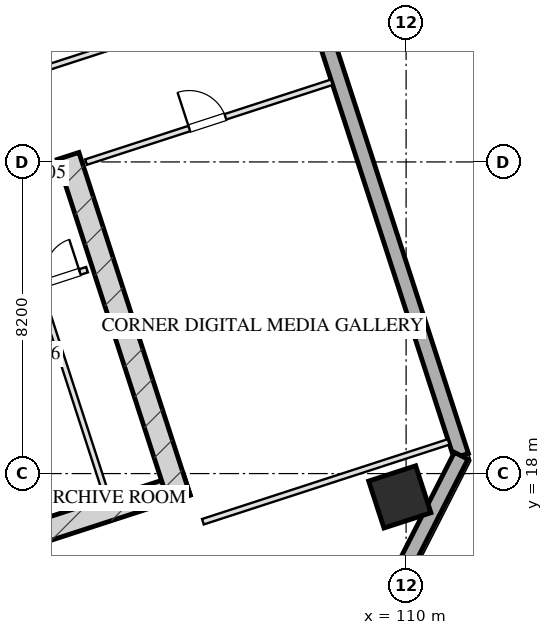
"""IFC4 building model, lengths in metres.
Left out: names, types, materials, properties, quantities, classifications, styles, units other than length and angle.
Written with IfcOpenShell. Run it as: python <this file> out.ifc"""

import sys

from ifc_helpers import new_model, si_unit, direction, frame, frame_2d, origin, origin_2d, place, context, subcontext, project, spatial, rectangle, hollow_rectangle, extrude, element, fill, save


model = new_model("IFC4")
c1 = context("Model", 3, precision=1e-05, world=origin(), true_north=direction((0.0, 1.0)))
c2 = subcontext(c1, "Body", "Model", "MODEL_VIEW")
j1 = project(units=[si_unit("LENGTHUNIT", "METRE"), si_unit("PLANEANGLEUNIT", "RADIAN")], contexts=[c1])
p1 = place(None, origin())
s1 = spatial("IfcSite", under=j1, at=p1, CompositionType="ELEMENT")
p2 = place(p1, origin())
s2 = spatial("IfcBuilding", under=s1, at=p2, CompositionType="ELEMENT")
p3 = place(p2, frame((0.0, 0.0, 180.55)))
s3 = spatial("IfcBuildingStorey", under=s2, at=p3, CompositionType="ELEMENT", Elevation=180.55)
p4 = place(p3, frame((88.63, 12.652, 0.0), z_axis=(0.0, 0.0, 1.0), x_axis=(0.95105714907, 0.309015046886, 0.0)))
e1 = element("IfcWall", 1, at=p4, inside=s3, PredefinedType="SHEAR", context=c2, shape_type="SweptSolid", body=[
    extrude(rectangle(XDim=16.4, YDim=0.6, at=frame_2d((8.2, 0.0))), origin(), (0.0, 0.0, 1.0), 3.45),
])
p5 = place(p3, frame((101.105, 26.358, 0.0), z_axis=(0.0, 0.0, 1.0), x_axis=(0.309010370028, -0.95105866865, 0.0)))
e2 = element("IfcWall", 2, at=p5, inside=s3, PredefinedType="SHEAR", context=c2, shape_type="SweptSolid", body=[
    extrude(rectangle(XDim=9.48, YDim=0.6, at=frame_2d((4.74, 0.0))), origin(), (0.0, 0.0, 1.0), 3.45),
])
p6 = place(p3, frame((109.835, 17.386, 0.0), z_axis=(0.0, 0.0, 1.0), x_axis=(0.951056516295, 0.309016994375, 0.0)))
e3 = element("IfcColumn", 3, at=p6, inside=s3, PredefinedType="COLUMN", context=c2, shape_type="SweptSolid", body=[
    extrude(hollow_rectangle(XDim=1.3, YDim=1.3, WallThickness=0.045, at=origin_2d()), origin(), (0.0, 0.0, 1.0), 3.451),
])
p7 = place(p3, frame((98.224, 59.173, 0.0), z_axis=(0.0, 0.0, 1.0), x_axis=(0.309014228706, -0.951057414911, 0.0)))
e4 = element("IfcWall", 4, at=p7, inside=s3, PredefinedType="SOLIDWALL", context=c2, shape_type="SweptSolid", body=[
    extrude(rectangle(XDim=42.8, YDim=0.4, at=frame_2d((21.4, 0.0))), origin(), (0.0, 0.0, 1.0), 2.55),
])
p8 = place(p7, frame((26.75, 0.0, 0.75)))
e5 = element("IfcOpeningElement", 5, at=p8, cuts=e4, PredefinedType="OPENING", context=c2, shape_type="SweptSolid", body=[
    extrude(rectangle(XDim=2.1, YDim=1.4, at=frame_2d((1.05, 0.7))), frame((0.0, 0.21, 0.0), z_axis=(0.0, -1.0, 0.0), x_axis=(1.0, 0.0, 0.0)), (0.0, 0.0, 1.0), 0.42),
])
p9 = place(p7, frame((22.95, 0.0, 0.75)))
e6 = element("IfcOpeningElement", 6, at=p9, cuts=e4, PredefinedType="OPENING", context=c2, shape_type="SweptSolid", body=[
    extrude(rectangle(XDim=2.1, YDim=1.4, at=frame_2d((1.05, 0.7))), frame((0.0, 0.21, 0.0), z_axis=(0.0, -1.0, 0.0), x_axis=(1.0, 0.0, 0.0)), (0.0, 0.0, 1.0), 0.42),
])
p10 = place(p7, frame((17.75, 0.0, 0.75)))
e7 = element("IfcOpeningElement", 7, at=p10, cuts=e4, PredefinedType="OPENING", context=c2, shape_type="SweptSolid", body=[
    extrude(rectangle(XDim=2.1, YDim=1.4, at=frame_2d((1.05, 0.7))), frame((0.0, 0.21, 0.0), z_axis=(0.0, -1.0, 0.0), x_axis=(1.0, 0.0, 0.0)), (0.0, 0.0, 1.0), 0.42),
])
p11 = place(p7, frame((13.95, 0.0, 0.75)))
e8 = element("IfcOpeningElement", 8, at=p11, cuts=e4, PredefinedType="OPENING", context=c2, shape_type="SweptSolid", body=[
    extrude(rectangle(XDim=2.1, YDim=1.4, at=frame_2d((1.05, 0.7))), frame((0.0, 0.21, 0.0), z_axis=(0.0, -1.0, 0.0), x_axis=(1.0, 0.0, 0.0)), (0.0, 0.0, 1.0), 0.42),
])
p12 = place(p3, frame((111.449, 18.468, 0.0), z_axis=(0.0, 0.0, 1.0), x_axis=(-0.454019523198, -0.890991735402, 0.0)))
e9 = element("IfcWall", 9, at=p12, inside=s3, PredefinedType="SOLIDWALL", context=c2, shape_type="SweptSolid", body=[
    extrude(rectangle(XDim=3.394, YDim=0.4, at=frame_2d((1.697, 0.0))), origin(), (0.0, 0.0, 1.0), 2.55),
])
p13 = place(p3, frame((97.727, 24.944, 0.0), z_axis=(0.0, 0.0, 1.0), x_axis=(0.951036872128, 0.309077446369, 0.0)))
e10 = element("IfcWall", 10, at=p13, inside=s3, PredefinedType="PARTITIONING", context=c2, shape_type="SweptSolid", body=[
    extrude(rectangle(XDim=3.2, YDim=0.15, at=frame_2d((1.6, 0.0))), origin(), (0.0, 0.0, 1.0), 3.155),
])
p14 = place(p13, frame((0.45, 0.0, 0.0)))
e11 = element("IfcOpeningElement", 11, at=p14, cuts=e10, PredefinedType="OPENING", context=c2, shape_type="SweptSolid", body=[
    extrude(rectangle(XDim=0.95, YDim=2.05, at=frame_2d((0.475, 1.025))), frame((0.0, 0.085, 0.0), z_axis=(0.0, -1.0, 0.0), x_axis=(1.0, 0.0, 0.0)), (0.0, 0.0, 1.0), 0.17),
])
p15 = place(p3, frame((98.561, 22.376, 0.0), z_axis=(0.0, 0.0, 1.0), x_axis=(0.95104415986, 0.309055020985, 0.0)))
e12 = element("IfcWall", 12, at=p15, inside=s3, PredefinedType="PARTITIONING", context=c2, shape_type="SweptSolid", body=[
    extrude(rectangle(XDim=3.2, YDim=0.15, at=frame_2d((1.6, 0.0))), origin(), (0.0, 0.0, 1.0), 3.155),
])
p16 = place(p15, frame((0.35, 0.0, 0.0)))
e13 = element("IfcOpeningElement", 13, at=p16, cuts=e12, PredefinedType="OPENING", context=c2, shape_type="SweptSolid", body=[
    extrude(rectangle(XDim=0.9, YDim=2.05, at=frame_2d((0.45, 1.025))), frame((0.0, 0.085, 0.0), z_axis=(0.0, -1.0, 0.0), x_axis=(1.0, 0.0, 0.0)), (0.0, 0.0, 1.0), 0.17),
])
p17 = place(p15, frame((2.1, 0.0, 0.0)))
e14 = element("IfcOpeningElement", 14, at=p17, cuts=e12, PredefinedType="OPENING", context=c2, shape_type="SweptSolid", body=[
    extrude(rectangle(XDim=0.9, YDim=2.05, at=frame_2d((0.45, 1.025))), frame((0.0, 0.085, 0.0), z_axis=(0.0, -1.0, 0.0), x_axis=(1.0, 0.0, 0.0)), (0.0, 0.0, 1.0), 0.17),
])
p18 = place(p3, frame((100.32, 22.948, 0.0), z_axis=(0.0, 0.0, 1.0), x_axis=(0.309035009867, -0.951050662518, 0.0)))
e15 = element("IfcWall", 15, at=p18, inside=s3, PredefinedType="PARTITIONING", context=c2, shape_type="SweptSolid", body=[
    extrude(rectangle(XDim=5.73, YDim=0.15, at=frame_2d((2.865, 0.0))), origin(), (0.0, 0.0, 1.0), 3.155),
])
p19 = place(p3, frame((104.653, 16.733, 0.0), z_axis=(0.0, 0.0, 1.0), x_axis=(0.951054383043, 0.309023559774, 0.0)))
e16 = element("IfcWall", 16, at=p19, inside=s3, PredefinedType="PARTITIONING", context=c2, shape_type="SweptSolid", body=[
    extrude(rectangle(XDim=6.8, YDim=0.15, at=frame_2d((3.4, 0.0))), origin(), (0.0, 0.0, 1.0), 3.155),
])
p20 = place(p3, frame((101.578, 26.196, 0.0), z_axis=(0.0, 0.0, 1.0), x_axis=(0.951064934653, 0.308991084134, 0.0)))
e17 = element("IfcWall", 17, at=p20, inside=s3, PredefinedType="PARTITIONING", context=c2, shape_type="SweptSolid", body=[
    extrude(rectangle(XDim=6.8, YDim=0.15, at=frame_2d((3.4, 0.0))), origin(), (0.0, 0.0, 1.0), 3.155),
])
p21 = place(p20, frame((2.856, 0.0, 0.0)))
e18 = element("IfcOpeningElement", 18, at=p21, cuts=e17, PredefinedType="OPENING", context=c2, shape_type="SweptSolid", body=[
    extrude(rectangle(XDim=1.0, YDim=2.05, at=frame_2d((0.5, 1.025))), frame((0.0, 0.085, 0.0), z_axis=(0.0, -1.0, 0.0), x_axis=(1.0, 0.0, 0.0)), (0.0, 0.0, 1.0), 0.17),
])
p22 = place(p3, frame((100.227, 28.575, 0.0), z_axis=(0.0, 0.0, 1.0), x_axis=(0.95104773735, 0.309044011885, 0.0)))
e19 = element("IfcWall", 19, at=p22, inside=s3, PredefinedType="PARTITIONING", context=c2, shape_type="SweptSolid", body=[
    extrude(rectangle(XDim=7.35, YDim=0.15, at=frame_2d((3.675, 0.0))), origin(), (0.0, 0.0, 1.0), 3.155),
])
p23 = place(p17, origin())
e20 = element("IfcDoor", 20, at=p23, inside=s3, OperationType="SINGLE_SWING_RIGHT", PredefinedType="DOOR", context=c2, shape_type="SweptSolid", body=[
    extrude(rectangle(XDim=0.9, YDim=2.05, at=frame_2d((0.45, 1.025))), frame((0.0, 0.025, 0.0), z_axis=(0.0, -1.0, 0.0), x_axis=(1.0, 0.0, 0.0)), (0.0, 0.0, 1.0), 0.05),
])
fill(e14, e20)
p24 = place(p21, origin())
e21 = element("IfcDoor", 21, at=p24, inside=s3, OperationType="SINGLE_SWING_LEFT", PredefinedType="DOOR", context=c2, shape_type="SweptSolid", body=[
    extrude(rectangle(XDim=1.0, YDim=2.05, at=frame_2d((0.5, 1.025))), frame((0.0, 0.025, 0.0), z_axis=(0.0, -1.0, 0.0), x_axis=(1.0, 0.0, 0.0)), (0.0, 0.0, 1.0), 0.05),
])
fill(e18, e21)
save(model, sys.argv[1])
